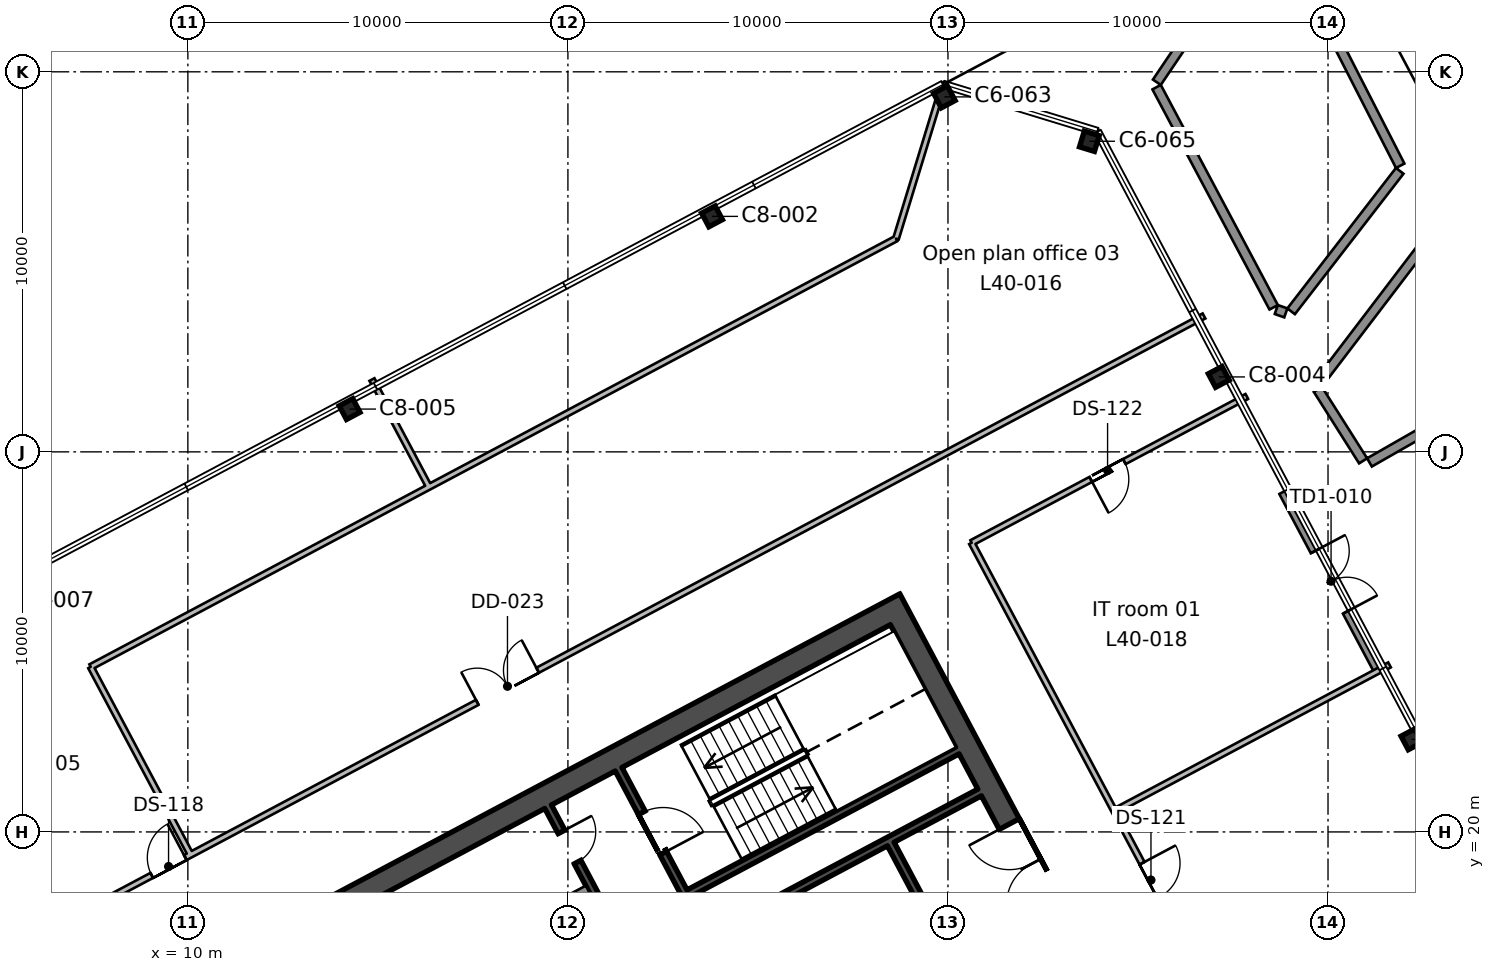
"""IFC4 building model, lengths in metres.
Left out: names, types, materials, properties, quantities, classifications, styles, units other than length and angle.
Written with IfcOpenShell. Run it as: python <this file> out.ifc"""

import sys

from ifc_helpers import new_model, si_unit, direction, frame, frame_2d, origin, origin_2d, place, context, subcontext, project, spatial, rectangle, i_section, extrude, element, fill, save


model = new_model("IFC4")
c1 = context("Model", 3, precision=1e-05, world=origin(), true_north=direction((0.0, 1.0)))
c2 = subcontext(c1, "Body", "Model", "MODEL_VIEW")
j1 = project(units=[si_unit("LENGTHUNIT", "METRE"), si_unit("PLANEANGLEUNIT", "RADIAN")], contexts=[c1])
p1 = place(None, origin())
s1 = spatial("IfcSite", under=j1, at=p1, CompositionType="ELEMENT")
p2 = place(p1, origin())
s2 = spatial("IfcBuilding", under=s1, at=p2, CompositionType="ELEMENT")
p3 = place(p2, frame((0.0, 0.0, 189.6)))
s3 = spatial("IfcBuildingStorey", under=s2, at=p3, CompositionType="ELEMENT", Elevation=189.6)
for number, where, z_axis, x_axis in (
    (1, (42.196, 22.436, 0.0), (0.0, 0.0, 1.0), (-0.469, 0.883, 0.0)),
    (2, (14.256, 31.126, 0.0), (0.0, 0.0, 1.0), (-0.883, -0.469, 0.0)),
    (3, (37.126, 31.972, 0.0), (0.0, 0.0, 1.0), (-0.469, 0.883, 0.0)),
    (4, (23.792, 36.196, 0.0), (0.0, 0.0, 1.0), (-0.883, -0.469, 0.0)),
):
    element("IfcColumn", number, at=place(p3, frame(where, z_axis=z_axis, x_axis=x_axis)), inside=s3, PredefinedType="COLUMN", context=c2, shape_type="SweptSolid", body=[
        extrude(i_section(OverallWidth=0.404, OverallDepth=0.406, WebThickness=0.027, FlangeThickness=0.044, FilletRadius=0.015, at=origin_2d()), origin(), (0.0, 0.0, 1.0), 3.9),
    ])
for number, where, z_axis, x_axis in (
    (5, (33.721, 38.173, 0.0), (0.0, 0.0, 1.0), (-0.956, 0.292, 0.0)),
    (6, (29.905, 39.34, 0.0), (0.0, 0.0, 1.0), (-0.883, -0.469, 0.0)),
):
    element("IfcColumn", number, at=place(p3, frame(where, z_axis=z_axis, x_axis=x_axis)), inside=s3, PredefinedType="COLUMN", context=c2, shape_type="SweptSolid", body=[
        extrude(i_section(OverallWidth=0.412, OverallDepth=0.434, WebThickness=0.036, FlangeThickness=0.057, FilletRadius=0.015, at=origin_2d()), origin(), (0.0, 0.0, 1.0), 3.9),
    ])
p4 = place(p3, frame((37.576, 8.994, 0.0), z_axis=(0.0, 0.0, 1.0), x_axis=(-0.469478769487, 0.88294376095, 0.0)))
e7 = element("IfcWall", 7, at=p4, inside=s3, PredefinedType="SHEAR", context=c2, shape_type="SweptSolid", body=[
    extrude(rectangle(XDim=19.4, YDim=0.6, at=frame_2d((9.7, 0.0))), origin(), (0.0, 0.0, 1.0), 3.9),
])
p5 = place(p4, frame((10.3, 0.0, 0.0)))
e8 = element("IfcOpeningElement", 8, at=p5, cuts=e7, PredefinedType="OPENING", context=c2, shape_type="SweptSolid", body=[
    extrude(rectangle(XDim=2.4, YDim=2.4, at=frame_2d((1.2, 1.2))), frame((0.0, 0.31, 0.0), z_axis=(0.0, -1.0, 0.0), x_axis=(1.0, 0.0, 0.0)), (0.0, 0.0, 1.0), 0.62),
])
p6 = place(p3, frame((10.509, 16.234, 0.0), z_axis=(0.0, 0.0, 1.0), x_axis=(0.88295010195, 0.469466843842, 0.0)))
e9 = element("IfcWall", 9, at=p6, inside=s3, PredefinedType="SHEAR", context=c2, shape_type="SweptSolid", body=[
    extrude(rectangle(XDim=20.2, YDim=0.6, at=frame_2d((10.1, 0.0))), origin(), (0.0, 0.0, 1.0), 3.9),
])
p7 = place(p3, frame((22.906, 14.218, 0.0), z_axis=(0.0, 0.0, 1.0), x_axis=(-0.469480409012, 0.88294288918, 0.0)))
e10 = element("IfcWall", 10, at=p7, inside=s3, PredefinedType="SHEAR", context=c2, shape_type="SweptSolid", body=[
    extrude(rectangle(XDim=7.3, YDim=0.2, at=frame_2d((3.65, 0.0))), origin(), (0.0, 0.0, 1.0), 3.9),
])
p8 = place(p7, frame((3.15, 0.0, 0.0)))
e11 = element("IfcOpeningElement", 11, at=p8, cuts=e10, PredefinedType="OPENING", context=c2, shape_type="SweptSolid", body=[
    extrude(rectangle(XDim=0.9, YDim=2.1, at=frame_2d((0.45, 1.05))), frame((0.0, 0.11, 0.0), z_axis=(0.0, -1.0, 0.0), x_axis=(1.0, 0.0, 0.0)), (0.0, 0.0, 1.0), 0.22),
])
p9 = place(p7, frame((5.65, 0.0, 0.0)))
e12 = element("IfcOpeningElement", 12, at=p9, cuts=e10, PredefinedType="OPENING", context=c2, shape_type="SweptSolid", body=[
    extrude(rectangle(XDim=0.9, YDim=2.1, at=frame_2d((0.45, 1.05))), frame((0.0, 0.11, 0.0), z_axis=(0.0, -1.0, 0.0), x_axis=(1.0, 0.0, 0.0)), (0.0, 0.0, 1.0), 0.22),
])
p10 = place(p3, frame((24.76, 15.204, 0.0), z_axis=(0.0, 0.0, 1.0), x_axis=(-0.469494272526, 0.882935517501, 0.0)))
e13 = element("IfcWall", 13, at=p10, inside=s3, PredefinedType="SHEAR", context=c2, shape_type="SweptSolid", body=[
    extrude(rectangle(XDim=7.3, YDim=0.2, at=frame_2d((3.65, 0.0))), origin(), (0.0, 0.0, 1.0), 3.9),
])
p11 = place(p10, frame((4.8, 0.0, 0.0)))
e14 = element("IfcOpeningElement", 14, at=p11, cuts=e13, PredefinedType="OPENING", context=c2, shape_type="SweptSolid", body=[
    extrude(rectangle(XDim=1.2, YDim=2.1, at=frame_2d((0.6, 1.05))), frame((0.0, 0.11, 0.0), z_axis=(0.0, -1.0, 0.0), x_axis=(1.0, 0.0, 0.0)), (0.0, 0.0, 1.0), 0.22),
])
p12 = place(p3, frame((29.528, 17.739, 0.0), z_axis=(0.0, 0.0, 1.0), x_axis=(-0.469401318492, 0.882984938828, 0.0)))
e15 = element("IfcWall", 15, at=p12, inside=s3, PredefinedType="SHEAR", context=c2, shape_type="SweptSolid", body=[
    extrude(rectangle(XDim=2.2, YDim=0.2, at=frame_2d((1.1, 0.0))), origin(), (0.0, 0.0, 1.0), 3.9),
])
p13 = place(p3, frame((23.769, 17.282, 0.0), z_axis=(0.0, 0.0, 1.0), x_axis=(0.882940221191, 0.469485426614, 0.0)))
e16 = element("IfcWall", 16, at=p13, inside=s3, PredefinedType="SHEAR", context=c2, shape_type="SweptSolid", body=[
    extrude(rectangle(XDim=8.0, YDim=0.2, at=frame_2d((4.0, 0.0))), origin(), (0.0, 0.0, 1.0), 3.9),
])
p14 = place(p3, frame((23.182, 18.385, 0.0), z_axis=(0.0, 0.0, 1.0), x_axis=(0.88295287151, 0.469461634952, 0.0)))
e17 = element("IfcWall", 17, at=p14, inside=s3, PredefinedType="SHEAR", context=c2, shape_type="SweptSolid", body=[
    extrude(rectangle(XDim=8.0, YDim=0.2, at=frame_2d((4.0, 0.0))), origin(), (0.0, 0.0, 1.0), 3.9),
])
p15 = place(p3, frame((15.926, 16.056, 0.0), z_axis=(0.0, 0.0, 1.0), x_axis=(0.882953967957, 0.469459572775, 0.0)))
e18 = element("IfcWall", 18, at=p15, inside=s3, PredefinedType="SOLIDWALL", context=c2, shape_type="SweptSolid", body=[
    extrude(rectangle(XDim=5.2, YDim=0.2, at=frame_2d((2.6, 0.0))), origin(), (0.0, 0.0, 1.0), 3.9),
])
p16 = place(p3, frame((39.739, 31.787, 0.0), z_axis=(0.0, 0.0, 1.0), x_axis=(0.606035472329, 0.795437619351, 0.0)))
e19 = element("IfcWall", 19, at=p16, inside=s3, PredefinedType="STANDARD", context=c2, shape_type="SweptSolid", body=[
    extrude(rectangle(XDim=4.75, YDim=0.25, at=frame_2d((2.375, 0.0))), origin(), (0.0, 0.0, 1.0), 0.65),
])
p17 = place(p3, frame((44.798, 31.843, 0.0), z_axis=(0.0, 0.0, 1.0), x_axis=(-0.86807423061, -0.496434416768, 0.0)))
e20 = element("IfcWall", 20, at=p17, inside=s3, PredefinedType="STANDARD", context=c2, shape_type="SweptSolid", body=[
    extrude(rectangle(XDim=4.271, YDim=0.25, at=frame_2d((2.135, 0.0))), origin(), (0.0, 0.0, 1.0), 0.65),
])
p18 = place(p3, frame((40.924, 29.763, 0.0), z_axis=(0.0, 0.0, 1.0), x_axis=(-0.535135579086, 0.844766187768, 0.0)))
e21 = element("IfcWall", 21, at=p18, inside=s3, PredefinedType="STANDARD", context=c2, shape_type="SweptSolid", body=[
    extrude(rectangle(XDim=2.226, YDim=0.25, at=frame_2d((1.113, 0.0))), origin(), (0.0, 0.0, 1.0), 0.65),
])
p19 = place(p3, frame((35.496, 39.725, 0.0), z_axis=(0.0, 0.0, 1.0), x_axis=(0.559130907229, 0.829079386175, 0.0)))
e22 = element("IfcWall", 22, at=p19, inside=s3, PredefinedType="STANDARD", context=c2, shape_type="SweptSolid", body=[
    extrude(rectangle(XDim=2.539, YDim=0.25, at=frame_2d((1.269, 0.0))), origin(), (0.0, 0.0, 1.0), 0.65),
])
p20 = place(p3, frame((40.183, 40.884, 0.0), z_axis=(0.0, 0.0, 1.0), x_axis=(0.455330156888, -0.890322665233, 0.0)))
e23 = element("IfcWall", 23, at=p20, inside=s3, PredefinedType="STANDARD", context=c2, shape_type="SweptSolid", body=[
    extrude(rectangle(XDim=3.769, YDim=0.25, at=frame_2d((1.885, 0.0))), origin(), (0.0, 0.0, 1.0), 0.65),
])
p21 = place(p3, frame((41.887, 37.394, 0.0), z_axis=(0.0, 0.0, 1.0), x_axis=(-0.61165126496, -0.791127505572, 0.0)))
e24 = element("IfcWall", 24, at=p21, inside=s3, PredefinedType="STANDARD", context=c2, shape_type="SweptSolid", body=[
    extrude(rectangle(XDim=4.671, YDim=0.25, at=frame_2d((2.335, 0.0))), origin(), (0.0, 0.0, 1.0), 0.65),
])
p22 = place(p3, frame((38.89, 33.657, 0.0), z_axis=(0.0, 0.0, 1.0), x_axis=(-0.944273306162, 0.32916245726, 0.0)))
e25 = element("IfcWall", 25, at=p22, inside=s3, PredefinedType="STANDARD", context=c2, shape_type="SweptSolid", body=[
    extrude(rectangle(XDim=0.266, YDim=0.25, at=frame_2d((0.133, 0.0))), origin(), (0.0, 0.0, 1.0), 0.65),
])
p23 = place(p3, frame((38.57, 33.804, 0.0), z_axis=(0.0, 0.0, 1.0), x_axis=(-0.469430907222, 0.882969208605, 0.0)))
e26 = element("IfcWall", 26, at=p23, inside=s3, PredefinedType="STANDARD", context=c2, shape_type="SweptSolid", body=[
    extrude(rectangle(XDim=6.561, YDim=0.25, at=frame_2d((3.28, 0.0))), origin(), (0.0, 0.0, 1.0), 0.65),
])
p24 = place(p3, frame((41.332, 24.242, 0.0), z_axis=(0.0, 0.0, 1.0), x_axis=(-0.469485426614, 0.882940221191, 0.0)))
e27 = element("IfcWall", 27, at=p24, inside=s3, PredefinedType="STANDARD", context=c2, shape_type="SweptSolid", body=[
    extrude(rectangle(XDim=5.333, YDim=0.25, at=frame_2d((2.667, 0.0))), origin(), (0.0, 0.0, 1.0), 2.529),
])
p25 = place(p24, frame((1.767, 0.0, 0.0)))
e28 = element("IfcOpeningElement", 28, at=p25, cuts=e27, PredefinedType="OPENING", context=c2, shape_type="SweptSolid", body=[
    extrude(rectangle(XDim=1.8, YDim=2.4, at=frame_2d((0.9, 1.2))), frame((0.0, 0.135, 0.0), z_axis=(0.0, -1.0, 0.0), x_axis=(1.0, 0.0, 0.0)), (0.0, 0.0, 1.0), 0.27),
])
p26 = place(p3, frame((0.0, 14.044, 0.0), z_axis=(0.0, 0.0, 1.0), x_axis=(0.882962129795, 0.469444221764, 0.0)))
e29 = element("IfcWall", 29, at=p26, inside=s3, PredefinedType="PARTITIONING", context=c2, shape_type="SweptSolid", body=[
    extrude(rectangle(XDim=41.607, YDim=0.15, at=frame_2d((20.803, 0.0))), origin(), (0.0, 0.0, 1.0), 3.54),
])
p27 = place(p26, frame((19.95, 0.0, 0.0)))
e30 = element("IfcOpeningElement", 30, at=p27, cuts=e29, PredefinedType="OPENING", context=c2, shape_type="SweptSolid", body=[
    extrude(rectangle(XDim=1.8, YDim=2.1, at=frame_2d((0.9, 1.05))), frame((0.0, 0.085, 0.0), z_axis=(0.0, -1.0, 0.0), x_axis=(1.0, 0.0, 0.0)), (0.0, 0.0, 1.0), 0.17),
])
p28 = place(p26, frame((10.25, 0.0, 0.0)))
e31 = element("IfcOpeningElement", 31, at=p28, cuts=e29, PredefinedType="OPENING", context=c2, shape_type="SweptSolid", body=[
    extrude(rectangle(XDim=1.0, YDim=2.1, at=frame_2d((0.5, 1.05))), frame((0.0, 0.085, 0.0), z_axis=(0.0, -1.0, 0.0), x_axis=(1.0, 0.0, 0.0)), (0.0, 0.0, 1.0), 0.17),
])
p29 = place(p3, frame((7.443, 24.344, 0.0), z_axis=(0.0, 0.0, 1.0), x_axis=(0.46934602066, -0.883014333344, 0.0)))
e32 = element("IfcWall", 32, at=p29, inside=s3, PredefinedType="PARTITIONING", context=c2, shape_type="SweptSolid", body=[
    extrude(rectangle(XDim=5.582, YDim=0.15, at=frame_2d((2.791, 0.0))), origin(), (0.0, 0.0, 1.0), 3.54),
])
p30 = place(p3, frame((7.443, 24.343, 0.0), z_axis=(0.0, 0.0, 1.0), x_axis=(0.882919378886, 0.469524621705, 0.0)))
e33 = element("IfcWall", 33, at=p30, inside=s3, PredefinedType="PARTITIONING", context=c2, shape_type="SweptSolid", body=[
    extrude(rectangle(XDim=10.082, YDim=0.15, at=frame_2d((5.041, 0.0))), origin(), (0.0, 0.0, 1.0), 3.54),
])
p31 = place(p3, frame((14.844, 31.903, 0.0), z_axis=(0.0, 0.0, 1.0), x_axis=(0.469051096607, -0.883171030306, 0.0)))
e34 = element("IfcWall", 34, at=p31, inside=s3, PredefinedType="PARTITIONING", context=c2, shape_type="SweptSolid", body=[
    extrude(rectangle(XDim=3.2, YDim=0.15, at=frame_2d((1.6, 0.0))), origin(), (0.0, 0.0, 1.0), 3.54),
])
p32 = place(p3, frame((16.345, 29.077, 0.0), z_axis=(0.0, 0.0, 1.0), x_axis=(0.882962129602, 0.469444222128, 0.0)))
e35 = element("IfcWall", 35, at=p32, inside=s3, PredefinedType="PARTITIONING", context=c2, shape_type="SweptSolid", body=[
    extrude(rectangle(XDim=13.917, YDim=0.15, at=frame_2d((6.958, 0.0))), origin(), (0.0, 0.0, 1.0), 3.54),
])
p33 = place(p3, frame((28.633, 35.61, 0.0), z_axis=(0.0, 0.0, 1.0), x_axis=(0.292294142097, 0.956328465798, 0.0)))
e36 = element("IfcWall", 36, at=p33, inside=s3, PredefinedType="PARTITIONING", context=c2, shape_type="SweptSolid", body=[
    extrude(rectangle(XDim=3.774, YDim=0.15, at=frame_2d((1.887, 0.0))), origin(), (0.0, 0.0, 1.0), 3.54),
])
p34 = place(p3, frame((37.864, 31.458, 0.0), z_axis=(0.0, 0.0, 1.0), x_axis=(-0.882947223068, -0.469472258261, 0.0)))
e37 = element("IfcWall", 37, at=p34, inside=s3, PredefinedType="PARTITIONING", context=c2, shape_type="SweptSolid", body=[
    extrude(rectangle(XDim=8.201, YDim=0.15, at=frame_2d((4.101, 0.0))), origin(), (0.0, 0.0, 1.0), 3.54),
])
p35 = place(p34, frame((3.65, 0.0, 0.0)))
e38 = element("IfcOpeningElement", 38, at=p35, cuts=e37, PredefinedType="OPENING", context=c2, shape_type="SweptSolid", body=[
    extrude(rectangle(XDim=1.0, YDim=2.1, at=frame_2d((0.5, 1.05))), frame((0.0, 0.085, 0.0), z_axis=(0.0, -1.0, 0.0), x_axis=(1.0, 0.0, 0.0)), (0.0, 0.0, 1.0), 0.17),
])
p36 = place(p3, frame((30.623, 27.608, 0.0), z_axis=(0.0, 0.0, 1.0), x_axis=(0.469489882812, -0.882937851685, 0.0)))
e39 = element("IfcWall", 39, at=p36, inside=s3, PredefinedType="PARTITIONING", context=c2, shape_type="SweptSolid", body=[
    extrude(rectangle(XDim=20.0, YDim=0.15, at=frame_2d((10.0, 0.0))), origin(), (0.0, 0.0, 1.0), 3.54),
])
p37 = place(p36, frame((9.55, 0.0, 0.0)))
e40 = element("IfcOpeningElement", 40, at=p37, cuts=e39, PredefinedType="OPENING", context=c2, shape_type="SweptSolid", body=[
    extrude(rectangle(XDim=1.0, YDim=2.1, at=frame_2d((0.5, 1.05))), frame((0.0, 0.085, 0.0), z_axis=(0.0, -1.0, 0.0), x_axis=(1.0, 0.0, 0.0)), (0.0, 0.0, 1.0), 0.17),
])
p38 = place(p3, frame((41.619, 24.395, 0.0), z_axis=(0.0, 0.0, 1.0), x_axis=(-0.882920973231, -0.4695216236, 0.0)))
e41 = element("IfcWall", 41, at=p38, inside=s3, PredefinedType="PARTITIONING", context=c2, shape_type="SweptSolid", body=[
    extrude(rectangle(XDim=8.2, YDim=0.15, at=frame_2d((4.1, 0.0))), origin(), (0.0, 0.0, 1.0), 3.54),
])
p39 = place(p5, origin())
e42 = element("IfcDoor", 42, at=p39, inside=s3, OperationType="DOUBLE_DOOR_SINGLE_SWING", PredefinedType="DOOR", context=c2, shape_type="SweptSolid", body=[
    extrude(rectangle(XDim=2.4, YDim=2.4, at=frame_2d((1.2, 1.2))), frame((0.0, 0.025, 0.0), z_axis=(0.0, -1.0, 0.0), x_axis=(1.0, 0.0, 0.0)), (0.0, 0.0, 1.0), 0.05),
])
fill(e8, e42)
p40 = place(p11, frame((1.2, 0.0, 0.0), z_axis=(0.0, 0.0, 1.0), x_axis=(-1.0, 0.0, 0.0)))
e43 = element("IfcDoor", 43, at=p40, inside=s3, OperationType="SINGLE_SWING_RIGHT", PredefinedType="DOOR", context=c2, shape_type="SweptSolid", body=[
    extrude(rectangle(XDim=1.2, YDim=2.1, at=frame_2d((0.6, 1.05))), frame((0.0, 0.025, 0.0), z_axis=(0.0, -1.0, 0.0), x_axis=(1.0, 0.0, 0.0)), (0.0, 0.0, 1.0), 0.05),
])
fill(e14, e43)
p41 = place(p9, frame((0.9, 0.0, 0.0), z_axis=(0.0, 0.0, 1.0), x_axis=(-1.0, 0.0, 0.0)))
e44 = element("IfcDoor", 44, at=p41, inside=s3, OperationType="SINGLE_SWING_LEFT", PredefinedType="DOOR", context=c2, shape_type="SweptSolid", body=[
    extrude(rectangle(XDim=0.9, YDim=2.1, at=frame_2d((0.45, 1.05))), frame((0.0, 0.025, 0.0), z_axis=(0.0, -1.0, 0.0), x_axis=(1.0, 0.0, 0.0)), (0.0, 0.0, 1.0), 0.05),
])
fill(e12, e44)
p42 = place(p25, frame((1.8, 0.0, 0.0), z_axis=(0.0, 0.0, 1.0), x_axis=(-1.0, 0.0, 0.0)))
e45 = element("IfcDoor", 45, at=p42, inside=s3, OperationType="DOUBLE_DOOR_SINGLE_SWING", PredefinedType="DOOR", context=c2, shape_type="SweptSolid", body=[
    extrude(rectangle(XDim=1.8, YDim=2.4, at=frame_2d((0.9, 1.2))), frame((0.0, 0.025, 0.0), z_axis=(0.0, -1.0, 0.0), x_axis=(1.0, 0.0, 0.0)), (0.0, 0.0, 1.0), 0.05),
])
fill(e28, e45)
p43 = place(p27, origin())
e46 = element("IfcDoor", 46, at=p43, inside=s3, OperationType="DOUBLE_DOOR_SINGLE_SWING", PredefinedType="DOOR", context=c2, shape_type="SweptSolid", body=[
    extrude(rectangle(XDim=1.8, YDim=2.1, at=frame_2d((0.9, 1.05))), frame((0.0, 0.025, 0.0), z_axis=(0.0, -1.0, 0.0), x_axis=(1.0, 0.0, 0.0)), (0.0, 0.0, 1.0), 0.05),
])
fill(e30, e46)
p44 = place(p28, origin())
e47 = element("IfcDoor", 47, at=p44, inside=s3, OperationType="SINGLE_SWING_RIGHT", PredefinedType="DOOR", context=c2, shape_type="SweptSolid", body=[
    extrude(rectangle(XDim=1.0, YDim=2.1, at=frame_2d((0.5, 1.05))), frame((0.0, 0.025, 0.0), z_axis=(0.0, -1.0, 0.0), x_axis=(1.0, 0.0, 0.0)), (0.0, 0.0, 1.0), 0.05),
])
fill(e31, e47)
p45 = place(p37, origin())
e48 = element("IfcDoor", 48, at=p45, inside=s3, OperationType="SINGLE_SWING_LEFT", PredefinedType="DOOR", context=c2, shape_type="SweptSolid", body=[
    extrude(rectangle(XDim=1.0, YDim=2.1, at=frame_2d((0.5, 1.05))), frame((0.0, 0.025, 0.0), z_axis=(0.0, -1.0, 0.0), x_axis=(1.0, 0.0, 0.0)), (0.0, 0.0, 1.0), 0.05),
])
fill(e40, e48)
p46 = place(p35, origin())
e49 = element("IfcDoor", 49, at=p46, inside=s3, OperationType="SINGLE_SWING_RIGHT", PredefinedType="DOOR", context=c2, shape_type="SweptSolid", body=[
    extrude(rectangle(XDim=1.0, YDim=2.1, at=frame_2d((0.5, 1.05))), frame((0.0, 0.025, 0.0), z_axis=(0.0, -1.0, 0.0), x_axis=(1.0, 0.0, 0.0)), (0.0, 0.0, 1.0), 0.05),
])
fill(e38, e49)
save(model, sys.argv[1])
